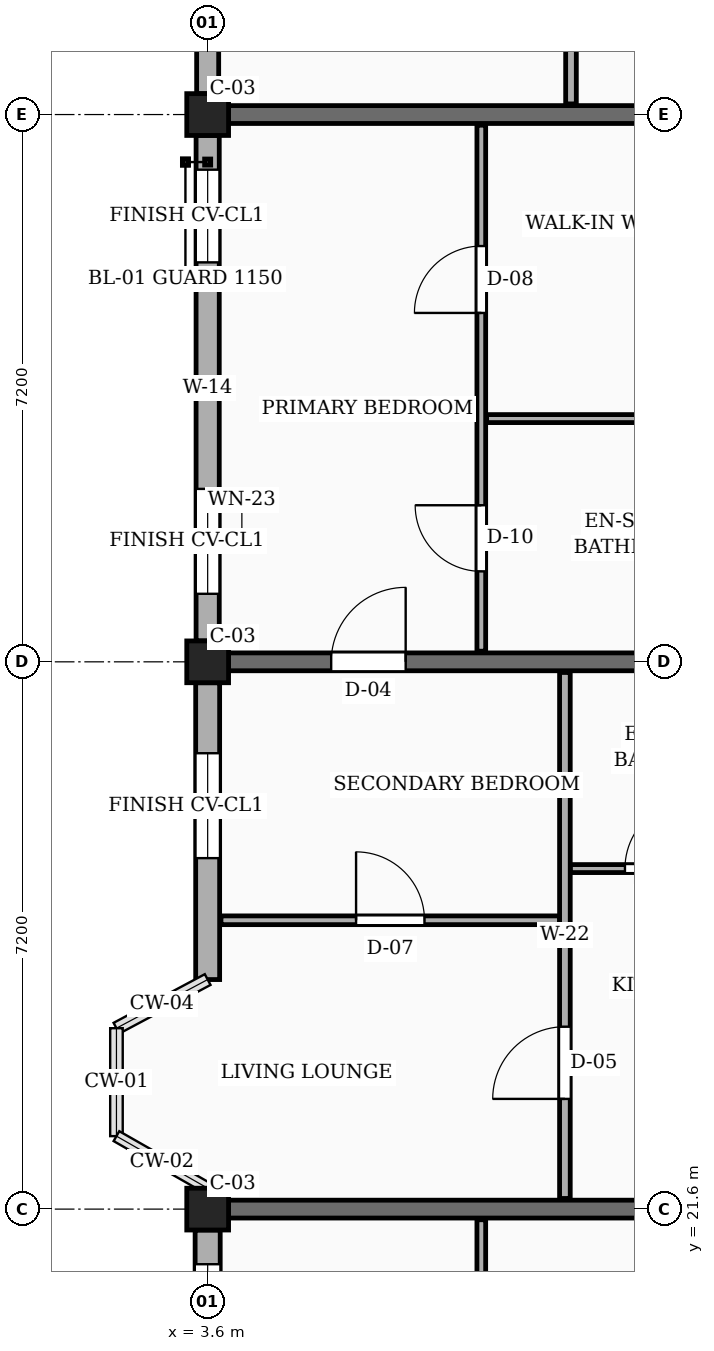
"""IFC4 building model, lengths in metres.
Left out: names, types, materials, properties, quantities, classifications, styles, units other than length and angle.
Written with IfcOpenShell. Run it as: python <this file> out.ifc"""

import sys

from ifc_helpers import new_model, si_unit, direction, frame, frame_2d, origin, origin_2d, place, context, subcontext, project, spatial, rectangle, extrude, element, fill, save


model = new_model("IFC4")
c1 = context("Model", 3, precision=1e-05, world=origin(), true_north=direction((0.0, 1.0)))
c2 = subcontext(c1, "Body", "Model", "MODEL_VIEW")
j1 = project(units=[si_unit("LENGTHUNIT", "METRE"), si_unit("PLANEANGLEUNIT", "RADIAN")], contexts=[c1])
p1 = place(None, origin())
s1 = spatial("IfcSite", under=j1, at=p1, CompositionType="ELEMENT")
p2 = place(p1, origin())
s2 = spatial("IfcBuilding", under=s1, at=p2, CompositionType="ELEMENT")
p3 = place(p2, frame((0.0, 0.0, 20.25)))
s3 = spatial("IfcBuildingStorey", under=s2, at=p3, CompositionType="ELEMENT", Elevation=20.25)
for number, where, z_axis, x_axis in (
    (1, (3.6, 21.6, 0.0), (0.0, 0.0, 1.0), (1.0, 0.0, 0.0)),
    (2, (3.6, 28.8, 0.0), (0.0, 0.0, 1.0), (1.0, 0.0, 0.0)),
    (3, (3.6, 36.0, 0.0), (0.0, 0.0, 1.0), (1.0, 0.0, 0.0)),
):
    element("IfcColumn", number, at=place(p3, frame(where, z_axis=z_axis, x_axis=x_axis)), inside=s3, PredefinedType="COLUMN", context=c2, shape_type="SweptSolid", body=[
        extrude(rectangle(XDim=0.55, YDim=0.55, at=origin_2d()), origin(), (0.0, 0.0, 1.0), 3.15),
    ])
p4 = place(p3, frame((3.875, 21.6, 0.0), z_axis=(0.0, 0.0, 1.0), x_axis=(1.0, 0.0, 0.0)))
e4 = element("IfcWall", 4, at=p4, inside=s3, PredefinedType="SOLIDWALL", context=c2, shape_type="SweptSolid", body=[
    extrude(rectangle(XDim=6.7, YDim=0.235, at=frame_2d((3.35, 0.0))), origin(), (0.0, 0.0, 1.0), 2.17),
])
p5 = place(p3, frame((3.875, 28.8, 0.0), z_axis=(0.0, 0.0, 1.0), x_axis=(1.0, 0.0, 0.0)))
e5 = element("IfcWall", 5, at=p5, inside=s3, PredefinedType="SOLIDWALL", context=c2, shape_type="SweptSolid", body=[
    extrude(rectangle(XDim=6.7, YDim=0.235, at=frame_2d((3.35, 0.0))), origin(), (0.0, 0.0, 1.0), 2.17),
])
p6 = place(p5, frame((1.35, 0.0, 0.0)))
e6 = element("IfcOpeningElement", 6, at=p6, cuts=e5, PredefinedType="OPENING", context=c2, shape_type="SweptSolid", body=[
    extrude(rectangle(XDim=0.98, YDim=2.12, at=frame_2d((0.49, 1.06))), frame((0.0, 0.127, 0.0), z_axis=(0.0, -1.0, 0.0), x_axis=(1.0, 0.0, 0.0)), (0.0, 0.0, 1.0), 0.255),
])
p7 = place(p3, frame((3.875, 36.0, 0.0), z_axis=(0.0, 0.0, 1.0), x_axis=(1.0, 0.0, 0.0)))
e7 = element("IfcWall", 7, at=p7, inside=s3, PredefinedType="SOLIDWALL", context=c2, shape_type="SweptSolid", body=[
    extrude(rectangle(XDim=6.7, YDim=0.235, at=frame_2d((3.35, 0.0))), origin(), (0.0, 0.0, 1.0), 2.17),
])
p8 = place(p3, frame((3.6, 42.925, 0.0), z_axis=(0.0, 0.0, 1.0), x_axis=(0.0, -1.0, 0.0)))
e8 = element("IfcWall", 8, at=p8, inside=s3, PredefinedType="SOLIDWALL", context=c2, shape_type="SweptSolid", body=[
    extrude(rectangle(XDim=6.65, YDim=0.29, at=frame_2d((3.325, 0.0))), origin(), (0.0, 0.0, 1.0), 2.44),
])
p9 = place(p8, frame((0.45, 0.0, 0.78)))
e9 = element("IfcOpeningElement", 9, at=p9, cuts=e8, PredefinedType="OPENING", context=c2, shape_type="SweptSolid", body=[
    extrude(rectangle(XDim=1.06, YDim=1.36, at=frame_2d((0.53, 0.68))), frame((0.0, 0.155, 0.0), z_axis=(0.0, -1.0, 0.0), x_axis=(1.0, 0.0, 0.0)), (0.0, 0.0, 1.0), 0.31),
])
p10 = place(p8, frame((4.65, 0.0, 0.78)))
e10 = element("IfcOpeningElement", 10, at=p10, cuts=e8, PredefinedType="OPENING", context=c2, shape_type="SweptSolid", body=[
    extrude(rectangle(XDim=1.22, YDim=1.36, at=frame_2d((0.61, 0.68))), frame((0.0, 0.155, 0.0), z_axis=(0.0, -1.0, 0.0), x_axis=(1.0, 0.0, 0.0)), (0.0, 0.0, 1.0), 0.31),
])
p11 = place(p3, frame((3.6, 35.725, 0.0), z_axis=(0.0, 0.0, 1.0), x_axis=(0.0, -1.0, 0.0)))
e11 = element("IfcWall", 11, at=p11, inside=s3, PredefinedType="SOLIDWALL", context=c2, shape_type="SweptSolid", body=[
    extrude(rectangle(XDim=6.65, YDim=0.305, at=frame_2d((3.325, 0.0))), origin(), (0.0, 0.0, 1.0), 2.44),
])
p12 = place(p11, frame((0.45, 0.0, 0.78)))
e12 = element("IfcOpeningElement", 12, at=p12, cuts=e11, PredefinedType="OPENING", context=c2, shape_type="SweptSolid", body=[
    extrude(rectangle(XDim=1.22, YDim=1.36, at=frame_2d((0.61, 0.68))), frame((0.0, 0.163, 0.0), z_axis=(0.0, -1.0, 0.0), x_axis=(1.0, 0.0, 0.0)), (0.0, 0.0, 1.0), 0.325),
])
p13 = place(p11, frame((4.65, 0.0, 0.78)))
e13 = element("IfcOpeningElement", 13, at=p13, cuts=e11, PredefinedType="OPENING", context=c2, shape_type="SweptSolid", body=[
    extrude(rectangle(XDim=1.38, YDim=1.36, at=frame_2d((0.69, 0.68))), frame((0.0, 0.163, 0.0), z_axis=(0.0, -1.0, 0.0), x_axis=(1.0, 0.0, 0.0)), (0.0, 0.0, 1.0), 0.325),
])
p14 = place(p3, frame((3.6, 28.525, 0.0), z_axis=(0.0, 0.0, 1.0), x_axis=(0.0, -1.0, 0.0)))
e14 = element("IfcWall", 14, at=p14, inside=s3, PredefinedType="SOLIDWALL", context=c2, shape_type="SweptSolid", body=[
    extrude(rectangle(XDim=3.905, YDim=0.315, at=frame_2d((1.952, 0.0))), origin(), (0.0, 0.0, 1.0), 2.44),
])
p15 = place(p14, frame((0.927, 0.0, 0.78)))
e15 = element("IfcOpeningElement", 15, at=p15, cuts=e14, PredefinedType="OPENING", context=c2, shape_type="SweptSolid", body=[
    extrude(rectangle(XDim=1.38, YDim=1.36, at=frame_2d((0.69, 0.68))), frame((0.0, 0.167, 0.0), z_axis=(0.0, -1.0, 0.0), x_axis=(1.0, 0.0, 0.0)), (0.0, 0.0, 1.0), 0.335),
])
p16 = place(p3, frame((3.6, 21.325, 0.0), z_axis=(0.0, 0.0, 1.0), x_axis=(0.0, -1.0, 0.0)))
e16 = element("IfcWall", 16, at=p16, inside=s3, PredefinedType="SOLIDWALL", context=c2, shape_type="SweptSolid", body=[
    extrude(rectangle(XDim=6.65, YDim=0.33, at=frame_2d((3.325, 0.0))), origin(), (0.0, 0.0, 1.0), 2.44),
])
p17 = place(p16, frame((0.45, 0.0, 0.78)))
e17 = element("IfcOpeningElement", 17, at=p17, cuts=e16, PredefinedType="OPENING", context=c2, shape_type="SweptSolid", body=[
    extrude(rectangle(XDim=1.46, YDim=1.36, at=frame_2d((0.73, 0.68))), frame((0.0, 0.175, 0.0), z_axis=(0.0, -1.0, 0.0), x_axis=(1.0, 0.0, 0.0)), (0.0, 0.0, 1.0), 0.35),
])
p18 = place(p16, frame((4.65, 0.0, 0.78)))
e18 = element("IfcOpeningElement", 18, at=p18, cuts=e16, PredefinedType="OPENING", context=c2, shape_type="SweptSolid", body=[
    extrude(rectangle(XDim=1.05, YDim=1.44, at=frame_2d((0.525, 0.72))), frame((0.0, 0.175, 0.0), z_axis=(0.0, -1.0, 0.0), x_axis=(1.0, 0.0, 0.0)), (0.0, 0.0, 1.0), 0.35),
])
p19 = place(p3, frame((7.2, 14.54, 0.0), z_axis=(0.0, 0.0, 1.0), x_axis=(0.0, 1.0, 0.0)))
e19 = element("IfcWall", 19, at=p19, inside=s3, PredefinedType="PARTITIONING", context=c2, shape_type="SweptSolid", body=[
    extrude(rectangle(XDim=6.92, YDim=0.115, at=frame_2d((3.46, 0.0))), origin(), (0.0, 0.0, 1.0), 2.305),
])
p20 = place(p19, frame((1.05, 0.0, 0.0)))
e20 = element("IfcOpeningElement", 20, at=p20, cuts=e19, PredefinedType="OPENING", context=c2, shape_type="SweptSolid", body=[
    extrude(rectangle(XDim=0.87, YDim=2.05, at=frame_2d((0.435, 1.025))), frame((0.0, 0.067, 0.0), z_axis=(0.0, -1.0, 0.0), x_axis=(1.0, 0.0, 0.0)), (0.0, 0.0, 1.0), 0.135),
])
p21 = place(p19, frame((4.45, 0.0, 0.0)))
e21 = element("IfcOpeningElement", 21, at=p21, cuts=e19, PredefinedType="OPENING", context=c2, shape_type="SweptSolid", body=[
    extrude(rectangle(XDim=0.88, YDim=2.08, at=frame_2d((0.44, 1.04))), frame((0.0, 0.067, 0.0), z_axis=(0.0, -1.0, 0.0), x_axis=(1.0, 0.0, 0.0)), (0.0, 0.0, 1.0), 0.135),
])
p22 = place(p3, frame((3.775, 25.4, 0.0), z_axis=(0.0, 0.0, 1.0), x_axis=(1.0, 0.0, 0.0)))
e22 = element("IfcWall", 22, at=p22, inside=s3, PredefinedType="PARTITIONING", context=c2, shape_type="SweptSolid", body=[
    extrude(rectangle(XDim=4.455, YDim=0.115, at=frame_2d((2.228, 0.0))), origin(), (0.0, 0.0, 1.0), 2.305),
])
p23 = place(p22, frame((1.778, 0.0, 0.0)))
e23 = element("IfcOpeningElement", 23, at=p23, cuts=e22, PredefinedType="OPENING", context=c2, shape_type="SweptSolid", body=[
    extrude(rectangle(XDim=0.9, YDim=2.1, at=frame_2d((0.45, 1.05))), frame((0.0, 0.067, 0.0), z_axis=(0.0, -1.0, 0.0), x_axis=(1.0, 0.0, 0.0)), (0.0, 0.0, 1.0), 0.135),
])
p24 = place(p3, frame((8.37, 26.08, 0.0), z_axis=(0.0, 0.0, 1.0), x_axis=(1.0, 0.0, 0.0)))
e24 = element("IfcWall", 24, at=p24, inside=s3, PredefinedType="PARTITIONING", context=c2, shape_type="SweptSolid", body=[
    extrude(rectangle(XDim=2.34, YDim=0.105, at=frame_2d((1.17, 0.0))), origin(), (0.0, 0.0, 1.0), 2.305),
])
p25 = place(p24, frame((0.72, 0.0, 0.0)))
e25 = element("IfcOpeningElement", 25, at=p25, cuts=e24, PredefinedType="OPENING", context=c2, shape_type="SweptSolid", body=[
    extrude(rectangle(XDim=0.9, YDim=2.05, at=frame_2d((0.45, 1.025))), frame((0.0, 0.062, 0.0), z_axis=(0.0, -1.0, 0.0), x_axis=(1.0, 0.0, 0.0)), (0.0, 0.0, 1.0), 0.125),
])
p26 = place(p3, frame((8.3, 21.74, 0.0), z_axis=(0.0, 0.0, 1.0), x_axis=(0.0, 1.0, 0.0)))
e26 = element("IfcWall", 26, at=p26, inside=s3, PredefinedType="PARTITIONING", context=c2, shape_type="SweptSolid", body=[
    extrude(rectangle(XDim=6.92, YDim=0.14, at=frame_2d((3.46, 0.0))), origin(), (0.0, 0.0, 1.0), 2.305),
])
p27 = place(p26, frame((1.31, 0.0, 0.0)))
e27 = element("IfcOpeningElement", 27, at=p27, cuts=e26, PredefinedType="OPENING", context=c2, shape_type="SweptSolid", body=[
    extrude(rectangle(XDim=0.95, YDim=2.1, at=frame_2d((0.475, 1.05))), frame((0.0, 0.08, 0.0), z_axis=(0.0, -1.0, 0.0), x_axis=(1.0, 0.0, 0.0)), (0.0, 0.0, 1.0), 0.16),
])
p28 = place(p3, frame((7.2, 28.94, 0.0), z_axis=(0.0, 0.0, 1.0), x_axis=(0.0, 1.0, 0.0)))
e28 = element("IfcWall", 28, at=p28, inside=s3, PredefinedType="PARTITIONING", context=c2, shape_type="SweptSolid", body=[
    extrude(rectangle(XDim=6.92, YDim=0.115, at=frame_2d((3.46, 0.0))), origin(), (0.0, 0.0, 1.0), 2.305),
])
p29 = place(p28, frame((1.05, 0.0, 0.0)))
e29 = element("IfcOpeningElement", 29, at=p29, cuts=e28, PredefinedType="OPENING", context=c2, shape_type="SweptSolid", body=[
    extrude(rectangle(XDim=0.87, YDim=2.05, at=frame_2d((0.435, 1.025))), frame((0.0, 0.067, 0.0), z_axis=(0.0, -1.0, 0.0), x_axis=(1.0, 0.0, 0.0)), (0.0, 0.0, 1.0), 0.135),
])
p30 = place(p28, frame((4.45, 0.0, 0.0)))
e30 = element("IfcOpeningElement", 30, at=p30, cuts=e28, PredefinedType="OPENING", context=c2, shape_type="SweptSolid", body=[
    extrude(rectangle(XDim=0.88, YDim=2.08, at=frame_2d((0.44, 1.04))), frame((0.0, 0.067, 0.0), z_axis=(0.0, -1.0, 0.0), x_axis=(1.0, 0.0, 0.0)), (0.0, 0.0, 1.0), 0.135),
])
p31 = place(p3, frame((7.27, 32.0, 0.0), z_axis=(0.0, 0.0, 1.0), x_axis=(1.0, 0.0, 0.0)))
e31 = element("IfcWall", 31, at=p31, inside=s3, PredefinedType="PARTITIONING", context=c2, shape_type="SweptSolid", body=[
    extrude(rectangle(XDim=3.39, YDim=0.105, at=frame_2d((1.695, 0.0))), origin(), (0.0, 0.0, 1.0), 2.305),
])
p32 = place(p3, frame((8.38, 36.14, 0.0), z_axis=(0.0, 0.0, 1.0), x_axis=(0.0, 1.0, 0.0)))
e32 = element("IfcWall", 32, at=p32, inside=s3, PredefinedType="PARTITIONING", context=c2, shape_type="SweptSolid", body=[
    extrude(rectangle(XDim=6.92, YDim=0.14, at=frame_2d((3.46, 0.0))), origin(), (0.0, 0.0, 1.0), 2.305),
])
p33 = place(p32, frame((1.31, 0.0, 0.0)))
e33 = element("IfcOpeningElement", 33, at=p33, cuts=e32, PredefinedType="OPENING", context=c2, shape_type="SweptSolid", body=[
    extrude(rectangle(XDim=0.92, YDim=2.1, at=frame_2d((0.46, 1.05))), frame((0.0, 0.08, 0.0), z_axis=(0.0, -1.0, 0.0), x_axis=(1.0, 0.0, 0.0)), (0.0, 0.0, 1.0), 0.16),
])
p34 = place(p12, origin())
e34 = element("IfcWindow", 34, at=p34, inside=s3, PartitioningType="SINGLE_PANEL", PredefinedType="WINDOW", context=c2, shape_type="SweptSolid", body=[
    extrude(rectangle(XDim=1.22, YDim=1.36, at=frame_2d((0.61, 0.68))), frame((0.0, 0.03, 0.0), z_axis=(0.0, -1.0, 0.0), x_axis=(1.0, 0.0, 0.0)), (0.0, 0.0, 1.0), 0.06),
])
fill(e12, e34)
p35 = place(p13, origin())
e35 = element("IfcWindow", 35, at=p35, inside=s3, PartitioningType="SINGLE_PANEL", PredefinedType="WINDOW", context=c2, shape_type="SweptSolid", body=[
    extrude(rectangle(XDim=1.38, YDim=1.36, at=frame_2d((0.69, 0.68))), frame((0.0, 0.03, 0.0), z_axis=(0.0, -1.0, 0.0), x_axis=(1.0, 0.0, 0.0)), (0.0, 0.0, 1.0), 0.06),
])
fill(e13, e35)
p36 = place(p15, origin())
e36 = element("IfcWindow", 36, at=p36, inside=s3, PartitioningType="SINGLE_PANEL", PredefinedType="WINDOW", context=c2, shape_type="SweptSolid", body=[
    extrude(rectangle(XDim=1.38, YDim=1.36, at=frame_2d((0.69, 0.68))), frame((0.0, 0.03, 0.0), z_axis=(0.0, -1.0, 0.0), x_axis=(1.0, 0.0, 0.0)), (0.0, 0.0, 1.0), 0.06),
])
fill(e15, e36)
p37 = place(p17, origin())
e37 = element("IfcWindow", 37, at=p37, inside=s3, PartitioningType="SINGLE_PANEL", PredefinedType="WINDOW", context=c2, shape_type="SweptSolid", body=[
    extrude(rectangle(XDim=1.46, YDim=1.36, at=frame_2d((0.73, 0.68))), frame((0.0, 0.03, 0.0), z_axis=(0.0, -1.0, 0.0), x_axis=(1.0, 0.0, 0.0)), (0.0, 0.0, 1.0), 0.06),
])
fill(e17, e37)
p38 = place(p23, origin())
e38 = element("IfcDoor", 38, at=p38, inside=s3, OperationType="SINGLE_SWING_LEFT", PredefinedType="DOOR", context=c2, shape_type="SweptSolid", body=[
    extrude(rectangle(XDim=0.9, YDim=2.1, at=frame_2d((0.45, 1.05))), frame((0.0, 0.025, 0.0), z_axis=(0.0, -1.0, 0.0), x_axis=(1.0, 0.0, 0.0)), (0.0, 0.0, 1.0), 0.05),
])
fill(e23, e38)
p39 = place(p25, origin())
e39 = element("IfcDoor", 39, at=p39, inside=s3, OperationType="SINGLE_SWING_RIGHT", PredefinedType="DOOR", context=c2, shape_type="SweptSolid", body=[
    extrude(rectangle(XDim=0.9, YDim=2.05, at=frame_2d((0.45, 1.025))), frame((0.0, 0.025, 0.0), z_axis=(0.0, -1.0, 0.0), x_axis=(1.0, 0.0, 0.0)), (0.0, 0.0, 1.0), 0.05),
])
fill(e25, e39)
p40 = place(p27, origin())
e40 = element("IfcDoor", 40, at=p40, inside=s3, OperationType="SINGLE_SWING_LEFT", PredefinedType="DOOR", context=c2, shape_type="SweptSolid", body=[
    extrude(rectangle(XDim=0.95, YDim=2.1, at=frame_2d((0.475, 1.05))), frame((0.0, 0.025, 0.0), z_axis=(0.0, -1.0, 0.0), x_axis=(1.0, 0.0, 0.0)), (0.0, 0.0, 1.0), 0.05),
])
fill(e27, e40)
p41 = place(p29, origin())
e41 = element("IfcDoor", 41, at=p41, inside=s3, OperationType="SINGLE_SWING_RIGHT", PredefinedType="DOOR", context=c2, shape_type="SweptSolid", body=[
    extrude(rectangle(XDim=0.87, YDim=2.05, at=frame_2d((0.435, 1.025))), frame((0.0, 0.025, 0.0), z_axis=(0.0, -1.0, 0.0), x_axis=(1.0, 0.0, 0.0)), (0.0, 0.0, 1.0), 0.05),
])
fill(e29, e41)
p42 = place(p30, origin())
e42 = element("IfcDoor", 42, at=p42, inside=s3, OperationType="SINGLE_SWING_LEFT", PredefinedType="DOOR", context=c2, shape_type="SweptSolid", body=[
    extrude(rectangle(XDim=0.88, YDim=2.08, at=frame_2d((0.44, 1.04))), frame((0.0, 0.025, 0.0), z_axis=(0.0, -1.0, 0.0), x_axis=(1.0, 0.0, 0.0)), (0.0, 0.0, 1.0), 0.05),
])
fill(e30, e42)
p43 = place(p6, origin())
e43 = element("IfcDoor", 43, at=p43, inside=s3, OperationType="SINGLE_SWING_RIGHT", PredefinedType="DOOR", context=c2, shape_type="SweptSolid", body=[
    extrude(rectangle(XDim=0.98, YDim=2.12, at=frame_2d((0.49, 1.06))), frame((0.0, 0.025, 0.0), z_axis=(0.0, -1.0, 0.0), x_axis=(1.0, 0.0, 0.0)), (0.0, 0.0, 1.0), 0.05),
])
fill(e6, e43)
save(model, sys.argv[1])
